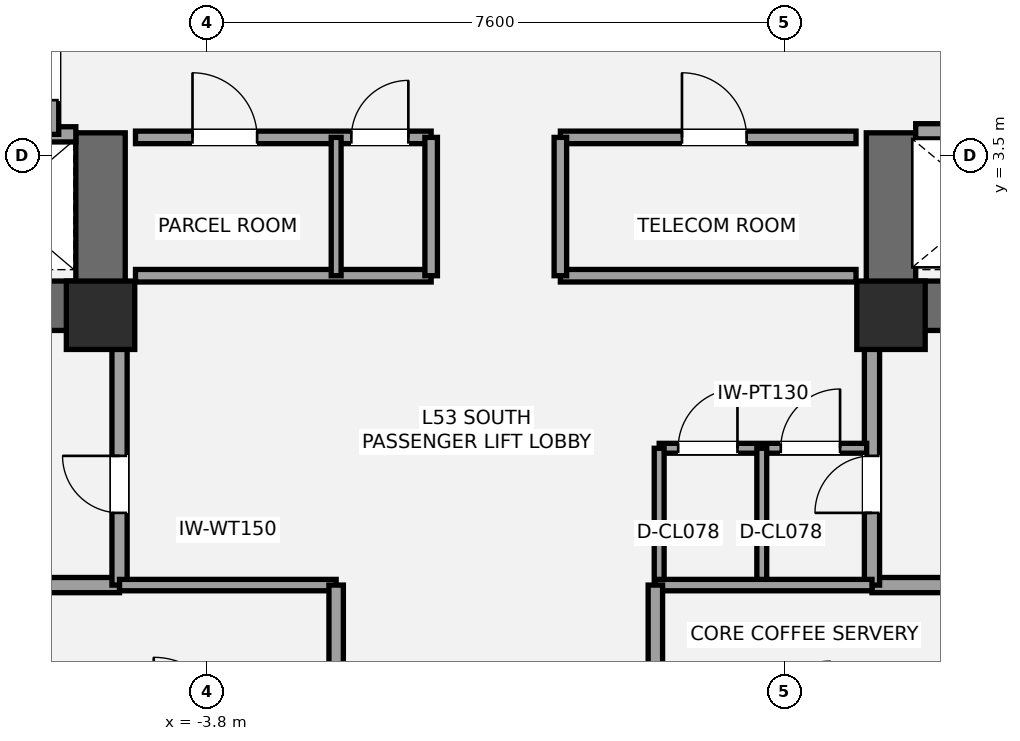
"""IFC4 building model, lengths in metres.
Left out: names, types, materials, properties, quantities, classifications, styles, units other than length and angle.
Written with IfcOpenShell. Run it as: python <this file> out.ifc"""

import sys

from ifc_helpers import new_model, si_unit, direction, frame, frame_2d, origin, origin_2d, place, context, subcontext, project, spatial, rectangle, extrude, element, fill, save


model = new_model("IFC4")
c1 = context("Model", 3, precision=1e-05, world=origin(), true_north=direction((0.0, 1.0)))
c2 = subcontext(c1, "Body", "Model", "MODEL_VIEW")
j1 = project(units=[si_unit("LENGTHUNIT", "METRE"), si_unit("PLANEANGLEUNIT", "RADIAN")], contexts=[c1])
p1 = place(None, origin())
s1 = spatial("IfcSite", under=j1, at=p1, CompositionType="ELEMENT")
p2 = place(p1, origin())
s2 = spatial("IfcBuilding", under=s1, at=p2, CompositionType="ELEMENT")
p3 = place(p2, frame((0.0, 0.0, 191.8)))
s3 = spatial("IfcBuildingStorey", under=s2, at=p3, CompositionType="ELEMENT", Elevation=191.8)
p4 = place(p3, frame((-4.875, 1.525, 0.0), z_axis=(0.0, 0.0, 1.0), x_axis=(-1.0, 0.0, 0.0)))
e1 = element("IfcWall", 1, at=p4, inside=s3, PredefinedType="SHEAR", context=c2, shape_type="SweptSolid", body=[
    extrude(rectangle(XDim=8.925, YDim=0.65, at=frame_2d((4.462, 0.0))), origin(), (0.0, 0.0, 1.0), 3.2),
])
p5 = place(p4, frame((5.425, 0.0, 0.0)))
e2 = element("IfcOpeningElement", 2, at=p5, cuts=e1, PredefinedType="OPENING", context=c2, shape_type="SweptSolid", body=[
    extrude(rectangle(XDim=1.05, YDim=2.15, at=frame_2d((0.525, 1.075))), frame((0.0, 0.335, 0.0), z_axis=(0.0, -1.0, 0.0), x_axis=(1.0, 0.0, 0.0)), (0.0, 0.0, 1.0), 0.67),
])
p6 = place(p4, frame((3.755, 0.0, 0.0)))
e3 = element("IfcOpeningElement", 3, at=p6, cuts=e1, PredefinedType="OPENING", context=c2, shape_type="SweptSolid", body=[
    extrude(rectangle(XDim=1.1, YDim=2.2, at=frame_2d((0.55, 1.1))), frame((0.0, 0.335, 0.0), z_axis=(0.0, -1.0, 0.0), x_axis=(1.0, 0.0, 0.0)), (0.0, 0.0, 1.0), 0.67),
])
p7 = place(p3, frame((-5.2, 1.2, 0.0), z_axis=(0.0, 0.0, 1.0), x_axis=(0.0, 1.0, 0.0)))
e4 = element("IfcWall", 4, at=p7, inside=s3, PredefinedType="SHEAR", context=c2, shape_type="SweptSolid", body=[
    extrude(rectangle(XDim=2.6, YDim=0.65, at=frame_2d((1.3, 0.0))), origin(), (0.0, 0.0, 1.0), 3.2),
])
p8 = place(p3, frame((13.8, 1.525, 0.0), z_axis=(0.0, 0.0, 1.0), x_axis=(-1.0, 0.0, 0.0)))
e5 = element("IfcWall", 5, at=p8, inside=s3, PredefinedType="SHEAR", context=c2, shape_type="SweptSolid", body=[
    extrude(rectangle(XDim=8.925, YDim=0.65, at=frame_2d((4.462, 0.0))), origin(), (0.0, 0.0, 1.0), 3.2),
])
p9 = place(p8, frame((2.45, 0.0, 0.0)))
e6 = element("IfcOpeningElement", 6, at=p9, cuts=e5, PredefinedType="OPENING", context=c2, shape_type="SweptSolid", body=[
    extrude(rectangle(XDim=1.05, YDim=2.15, at=frame_2d((0.525, 1.075))), frame((0.0, 0.335, 0.0), z_axis=(0.0, -1.0, 0.0), x_axis=(1.0, 0.0, 0.0)), (0.0, 0.0, 1.0), 0.67),
])
p10 = place(p8, frame((4.45, 0.0, 0.0)))
e7 = element("IfcOpeningElement", 7, at=p10, cuts=e5, PredefinedType="OPENING", context=c2, shape_type="SweptSolid", body=[
    extrude(rectangle(XDim=1.1, YDim=2.2, at=frame_2d((0.55, 1.1))), frame((0.0, 0.335, 0.0), z_axis=(0.0, -1.0, 0.0), x_axis=(1.0, 0.0, 0.0)), (0.0, 0.0, 1.0), 0.67),
])
p11 = place(p3, frame((5.2, 1.2, 0.0), z_axis=(0.0, 0.0, 1.0), x_axis=(0.0, 1.0, 0.0)))
e8 = element("IfcWall", 8, at=p11, inside=s3, PredefinedType="SHEAR", context=c2, shape_type="SweptSolid", body=[
    extrude(rectangle(XDim=2.6, YDim=0.65, at=frame_2d((1.3, 0.0))), origin(), (0.0, 0.0, 1.0), 3.2),
])
for number, where, z_axis, x_axis in (
    (9, (-5.2, 1.4, 0.0), (0.0, 0.0, 1.0), (1.0, 0.0, 0.0)),
    (10, (5.2, 1.4, 0.0), (0.0, 0.0, 1.0), (1.0, 0.0, 0.0)),
):
    element("IfcColumn", number, at=place(p3, frame(where, z_axis=z_axis, x_axis=x_axis)), inside=s3, PredefinedType="COLUMN", context=c2, shape_type="SweptSolid", body=[
        extrude(rectangle(XDim=0.9, YDim=0.9, at=origin_2d()), origin(), (0.0, 0.0, 1.0), 3.2),
    ])
p12 = place(p3, frame((-7.2, -2.15, 0.0), z_axis=(0.0, 0.0, 1.0), x_axis=(1.0, 0.0, 0.0)))
e11 = element("IfcWall", 11, at=p12, inside=s3, PredefinedType="SOLIDWALL", context=c2, shape_type="SweptSolid", body=[
    extrude(rectangle(XDim=2.25, YDim=0.2, at=frame_2d((1.125, 0.0))), origin(), (0.0, 0.0, 1.0), 3.02),
])
p13 = place(p3, frame((-4.95, -2.15, 0.0), z_axis=(0.0, 0.0, 1.0), x_axis=(0.0, 1.0, 0.0)))
e12 = element("IfcWall", 12, at=p13, inside=s3, PredefinedType="SOLIDWALL", context=c2, shape_type="SweptSolid", body=[
    extrude(rectangle(XDim=3.4, YDim=0.2, at=frame_2d((1.7, 0.0))), origin(), (0.0, 0.0, 1.0), 2.473),
])
p14 = place(p13, frame((0.95, 0.0, 0.0)))
e13 = element("IfcOpeningElement", 13, at=p14, cuts=e12, PredefinedType="OPENING", context=c2, shape_type="SweptSolid", body=[
    extrude(rectangle(XDim=0.75, YDim=2.1, at=frame_2d((0.375, 1.05))), frame((0.0, 0.11, 0.0), z_axis=(0.0, -1.0, 0.0), x_axis=(1.0, 0.0, 0.0)), (0.0, 0.0, 1.0), 0.22),
])
p15 = place(p3, frame((4.95, -2.15, 0.0), z_axis=(0.0, 0.0, 1.0), x_axis=(1.0, 0.0, 0.0)))
e14 = element("IfcWall", 14, at=p15, inside=s3, PredefinedType="SOLIDWALL", context=c2, shape_type="SweptSolid", body=[
    extrude(rectangle(XDim=2.25, YDim=0.2, at=frame_2d((1.125, 0.0))), origin(), (0.0, 0.0, 1.0), 3.02),
])
p16 = place(p3, frame((4.95, -2.15, 0.0), z_axis=(0.0, 0.0, 1.0), x_axis=(0.0, 1.0, 0.0)))
e15 = element("IfcWall", 15, at=p16, inside=s3, PredefinedType="SOLIDWALL", context=c2, shape_type="SweptSolid", body=[
    extrude(rectangle(XDim=3.4, YDim=0.2, at=frame_2d((1.7, 0.0))), origin(), (0.0, 0.0, 1.0), 2.473),
])
p17 = place(p16, frame((0.95, 0.0, 0.0)))
e16 = element("IfcOpeningElement", 16, at=p17, cuts=e15, PredefinedType="OPENING", context=c2, shape_type="SweptSolid", body=[
    extrude(rectangle(XDim=0.75, YDim=2.1, at=frame_2d((0.375, 1.05))), frame((0.0, 0.11, 0.0), z_axis=(0.0, -1.0, 0.0), x_axis=(1.0, 0.0, 0.0)), (0.0, 0.0, 1.0), 0.22),
])
p18 = place(p3, frame((2.15, -0.35, 0.0), z_axis=(0.0, 0.0, 1.0), x_axis=(1.0, 0.0, 0.0)))
e17 = element("IfcWall", 17, at=p18, inside=s3, PredefinedType="PARTITIONING", context=c2, shape_type="SweptSolid", body=[
    extrude(rectangle(XDim=2.73, YDim=0.13, at=frame_2d((1.365, 0.0))), origin(), (0.0, 0.0, 1.0), 3.02),
])
p19 = place(p18, frame((0.25, 0.0, 0.0)))
e18 = element("IfcOpeningElement", 18, at=p19, cuts=e17, PredefinedType="OPENING", context=c2, shape_type="SweptSolid", body=[
    extrude(rectangle(XDim=0.78, YDim=2.1, at=frame_2d((0.39, 1.05))), frame((0.0, 0.075, 0.0), z_axis=(0.0, -1.0, 0.0), x_axis=(1.0, 0.0, 0.0)), (0.0, 0.0, 1.0), 0.15),
])
p20 = place(p18, frame((1.6, 0.0, 0.0)))
e19 = element("IfcOpeningElement", 19, at=p20, cuts=e17, PredefinedType="OPENING", context=c2, shape_type="SweptSolid", body=[
    extrude(rectangle(XDim=0.78, YDim=2.1, at=frame_2d((0.39, 1.05))), frame((0.0, 0.075, 0.0), z_axis=(0.0, -1.0, 0.0), x_axis=(1.0, 0.0, 0.0)), (0.0, 0.0, 1.0), 0.15),
])
for number, where, z_axis, x_axis in (
    (20, (2.15, -2.15, 0.0), (0.0, 0.0, 1.0), (0.0, 1.0, 0.0)),
    (21, (3.5, -2.15, 0.0), (0.0, 0.0, 1.0), (0.0, 1.0, 0.0)),
):
    element("IfcWall", number, at=place(p3, frame(where, z_axis=z_axis, x_axis=x_axis)), inside=s3, PredefinedType="PARTITIONING", context=c2, shape_type="SweptSolid", body=[
        extrude(rectangle(XDim=1.8, YDim=0.13, at=frame_2d((0.9, 0.0))), origin(), (0.0, 0.0, 1.0), 3.02),
    ])
p21 = place(p3, frame((-9.78, 3.78, 0.0), z_axis=(0.0, 0.0, 1.0), x_axis=(1.0, 0.0, 0.0)))
e22 = element("IfcWall", 22, at=p21, inside=s3, PredefinedType="SOLIDWALL", context=c2, shape_type="SweptSolid", body=[
    extrude(rectangle(XDim=4.255, YDim=0.2, at=frame_2d((2.127, 0.0))), origin(), (0.0, 0.0, 1.0), 3.02),
])
p22 = place(p3, frame((-5.85, 3.78, 0.0), z_axis=(0.0, 0.0, 1.0), x_axis=(0.0, 1.0, 0.0)))
e23 = element("IfcWall", 23, at=p22, inside=s3, PredefinedType="SOLIDWALL", context=c2, shape_type="SweptSolid", body=[
    extrude(rectangle(XDim=1.69, YDim=0.2, at=frame_2d((0.845, 0.0))), origin(), (0.0, 0.0, 1.0), 3.02),
])
p23 = place(p22, frame((0.45, 0.0, 0.0)))
e24 = element("IfcOpeningElement", 24, at=p23, cuts=e23, PredefinedType="OPENING", context=c2, shape_type="SweptSolid", body=[
    extrude(rectangle(XDim=0.75, YDim=2.1, at=frame_2d((0.375, 1.05))), frame((0.0, 0.11, 0.0), z_axis=(0.0, -1.0, 0.0), x_axis=(1.0, 0.0, 0.0)), (0.0, 0.0, 1.0), 0.22),
])
p24 = place(p3, frame((5.525, 3.82, 0.0), z_axis=(0.0, 0.0, 1.0), x_axis=(1.0, 0.0, 0.0)))
e25 = element("IfcWall", 25, at=p24, inside=s3, PredefinedType="SOLIDWALL", context=c2, shape_type="SweptSolid", body=[
    extrude(rectangle(XDim=4.255, YDim=0.2, at=frame_2d((2.127, 0.0))), origin(), (0.0, 0.0, 1.0), 3.02),
])
p25 = place(p24, frame((0.65, 0.0, 0.0)))
e26 = element("IfcOpeningElement", 26, at=p25, cuts=e25, PredefinedType="OPENING", context=c2, shape_type="SweptSolid", body=[
    extrude(rectangle(XDim=1.2, YDim=2.2, at=frame_2d((0.6, 1.1))), frame((0.0, 0.11, 0.0), z_axis=(0.0, -1.0, 0.0), x_axis=(1.0, 0.0, 0.0)), (0.0, 0.0, 1.0), 0.22),
])
p26 = place(p3, frame((-4.74, 1.92, 0.0), z_axis=(0.0, 0.0, 1.0), x_axis=(1.0, 0.0, 0.0)))
e27 = element("IfcWall", 27, at=p26, inside=s3, PredefinedType="PARTITIONING", context=c2, shape_type="SweptSolid", body=[
    extrude(rectangle(XDim=3.89, YDim=0.165, at=frame_2d((1.945, 0.0))), origin(), (0.0, 0.0, 1.0), 2.16),
])
p27 = place(p3, frame((-4.74, 3.74, 0.0), z_axis=(0.0, 0.0, 1.0), x_axis=(1.0, 0.0, 0.0)))
e28 = element("IfcWall", 28, at=p27, inside=s3, PredefinedType="PARTITIONING", context=c2, shape_type="SweptSolid", body=[
    extrude(rectangle(XDim=3.89, YDim=0.165, at=frame_2d((1.945, 0.0))), origin(), (0.0, 0.0, 1.0), 3.02),
])
p28 = place(p27, frame((0.75, 0.0, 0.0)))
e29 = element("IfcOpeningElement", 29, at=p28, cuts=e28, PredefinedType="OPENING", context=c2, shape_type="SweptSolid", body=[
    extrude(rectangle(XDim=0.85, YDim=2.1, at=frame_2d((0.425, 1.05))), frame((0.0, 0.093, 0.0), z_axis=(0.0, -1.0, 0.0), x_axis=(1.0, 0.0, 0.0)), (0.0, 0.0, 1.0), 0.185),
])
p29 = place(p27, frame((2.84, 0.0, 0.0)))
e30 = element("IfcOpeningElement", 30, at=p29, cuts=e28, PredefinedType="OPENING", context=c2, shape_type="SweptSolid", body=[
    extrude(rectangle(XDim=0.75, YDim=2.1, at=frame_2d((0.375, 1.05))), frame((0.0, 0.093, 0.0), z_axis=(0.0, -1.0, 0.0), x_axis=(1.0, 0.0, 0.0)), (0.0, 0.0, 1.0), 0.185),
])
p30 = place(p3, frame((-0.85, 1.92, 0.0), z_axis=(0.0, 0.0, 1.0), x_axis=(0.0, 1.0, 0.0)))
e31 = element("IfcWall", 31, at=p30, inside=s3, PredefinedType="PARTITIONING", context=c2, shape_type="SweptSolid", body=[
    extrude(rectangle(XDim=1.82, YDim=0.165, at=frame_2d((0.91, 0.0))), origin(), (0.0, 0.0, 1.0), 3.02),
])
p31 = place(p3, frame((0.85, 1.92, 0.0), z_axis=(0.0, 0.0, 1.0), x_axis=(1.0, 0.0, 0.0)))
e32 = element("IfcWall", 32, at=p31, inside=s3, PredefinedType="PARTITIONING", context=c2, shape_type="SweptSolid", body=[
    extrude(rectangle(XDim=3.89, YDim=0.165, at=frame_2d((1.945, 0.0))), origin(), (0.0, 0.0, 1.0), 2.16),
])
p32 = place(p3, frame((0.85, 3.74, 0.0), z_axis=(0.0, 0.0, 1.0), x_axis=(1.0, 0.0, 0.0)))
e33 = element("IfcWall", 33, at=p32, inside=s3, PredefinedType="PARTITIONING", context=c2, shape_type="SweptSolid", body=[
    extrude(rectangle(XDim=3.89, YDim=0.165, at=frame_2d((1.945, 0.0))), origin(), (0.0, 0.0, 1.0), 3.02),
])
p33 = place(p32, frame((1.6, 0.0, 0.0)))
e34 = element("IfcOpeningElement", 34, at=p33, cuts=e33, PredefinedType="OPENING", context=c2, shape_type="SweptSolid", body=[
    extrude(rectangle(XDim=0.85, YDim=2.1, at=frame_2d((0.425, 1.05))), frame((0.0, 0.093, 0.0), z_axis=(0.0, -1.0, 0.0), x_axis=(1.0, 0.0, 0.0)), (0.0, 0.0, 1.0), 0.185),
])
p34 = place(p3, frame((0.85, 1.92, 0.0), z_axis=(0.0, 0.0, 1.0), x_axis=(0.0, 1.0, 0.0)))
e35 = element("IfcWall", 35, at=p34, inside=s3, PredefinedType="PARTITIONING", context=c2, shape_type="SweptSolid", body=[
    extrude(rectangle(XDim=1.82, YDim=0.165, at=frame_2d((0.91, 0.0))), origin(), (0.0, 0.0, 1.0), 3.02),
])
p35 = place(p3, frame((-2.1, 1.92, 0.0), z_axis=(0.0, 0.0, 1.0), x_axis=(0.0, 1.0, 0.0)))
e36 = element("IfcWall", 36, at=p35, inside=s3, PredefinedType="PARTITIONING", context=c2, shape_type="SweptSolid", body=[
    extrude(rectangle(XDim=1.82, YDim=0.13, at=frame_2d((0.91, 0.0))), origin(), (0.0, 0.0, 1.0), 3.02),
])
p36 = place(p3, frame((-4.95, -2.15, 0.0), z_axis=(0.0, 0.0, 1.0), x_axis=(1.0, 0.0, 0.0)))
e37 = element("IfcWall", 37, at=p36, inside=s3, PredefinedType="PLUMBINGWALL", context=c2, shape_type="SweptSolid", body=[
    extrude(rectangle(XDim=2.85, YDim=0.15, at=frame_2d((1.425, 0.0))), origin(), (0.0, 0.0, 1.0), 3.02),
])
p37 = place(p3, frame((-2.1, -4.05, 0.0), z_axis=(0.0, 0.0, 1.0), x_axis=(0.0, 1.0, 0.0)))
e38 = element("IfcWall", 38, at=p37, inside=s3, PredefinedType="PLUMBINGWALL", context=c2, shape_type="SweptSolid", body=[
    extrude(rectangle(XDim=1.9, YDim=0.19, at=frame_2d((0.95, 0.0))), origin(), (0.0, 0.0, 1.0), 3.02),
])
p38 = place(p3, frame((2.1, -2.15, 0.0), z_axis=(0.0, 0.0, 1.0), x_axis=(1.0, 0.0, 0.0)))
e39 = element("IfcWall", 39, at=p38, inside=s3, PredefinedType="PLUMBINGWALL", context=c2, shape_type="SweptSolid", body=[
    extrude(rectangle(XDim=2.85, YDim=0.15, at=frame_2d((1.425, 0.0))), origin(), (0.0, 0.0, 1.0), 3.02),
])
p39 = place(p3, frame((2.1, -4.05, 0.0), z_axis=(0.0, 0.0, 1.0), x_axis=(0.0, 1.0, 0.0)))
e40 = element("IfcWall", 40, at=p39, inside=s3, PredefinedType="PLUMBINGWALL", context=c2, shape_type="SweptSolid", body=[
    extrude(rectangle(XDim=1.9, YDim=0.19, at=frame_2d((0.95, 0.0))), origin(), (0.0, 0.0, 1.0), 3.02),
])
p40 = place(p14, origin())
e41 = element("IfcDoor", 41, at=p40, inside=s3, OperationType="SINGLE_SWING_RIGHT", PredefinedType="DOOR", context=c2, shape_type="SweptSolid", body=[
    extrude(rectangle(XDim=0.75, YDim=2.1, at=frame_2d((0.375, 1.05))), frame((0.0, 0.025, 0.0), z_axis=(0.0, -1.0, 0.0), x_axis=(1.0, 0.0, 0.0)), (0.0, 0.0, 1.0), 0.05),
])
fill(e13, e41)
p41 = place(p17, origin())
e42 = element("IfcDoor", 42, at=p41, inside=s3, OperationType="SINGLE_SWING_LEFT", PredefinedType="DOOR", context=c2, shape_type="SweptSolid", body=[
    extrude(rectangle(XDim=0.75, YDim=2.1, at=frame_2d((0.375, 1.05))), frame((0.0, 0.025, 0.0), z_axis=(0.0, -1.0, 0.0), x_axis=(1.0, 0.0, 0.0)), (0.0, 0.0, 1.0), 0.05),
])
fill(e16, e42)
p42 = place(p19, origin())
e43 = element("IfcDoor", 43, at=p42, inside=s3, OperationType="SINGLE_SWING_RIGHT", PredefinedType="DOOR", context=c2, shape_type="SweptSolid", body=[
    extrude(rectangle(XDim=0.78, YDim=2.1, at=frame_2d((0.39, 1.05))), frame((0.0, 0.025, 0.0), z_axis=(0.0, -1.0, 0.0), x_axis=(1.0, 0.0, 0.0)), (0.0, 0.0, 1.0), 0.05),
])
fill(e18, e43)
p43 = place(p20, origin())
e44 = element("IfcDoor", 44, at=p43, inside=s3, OperationType="SINGLE_SWING_RIGHT", PredefinedType="DOOR", context=c2, shape_type="SweptSolid", body=[
    extrude(rectangle(XDim=0.78, YDim=2.1, at=frame_2d((0.39, 1.05))), frame((0.0, 0.025, 0.0), z_axis=(0.0, -1.0, 0.0), x_axis=(1.0, 0.0, 0.0)), (0.0, 0.0, 1.0), 0.05),
])
fill(e19, e44)
p44 = place(p23, origin())
e45 = element("IfcDoor", 45, at=p44, inside=s3, OperationType="SINGLE_SWING_RIGHT", PredefinedType="DOOR", context=c2, shape_type="SweptSolid", body=[
    extrude(rectangle(XDim=0.75, YDim=2.1, at=frame_2d((0.375, 1.05))), frame((0.0, 0.025, 0.0), z_axis=(0.0, -1.0, 0.0), x_axis=(1.0, 0.0, 0.0)), (0.0, 0.0, 1.0), 0.05),
])
fill(e24, e45)
p45 = place(p28, origin())
e46 = element("IfcDoor", 46, at=p45, inside=s3, OperationType="SINGLE_SWING_LEFT", PredefinedType="DOOR", context=c2, shape_type="SweptSolid", body=[
    extrude(rectangle(XDim=0.85, YDim=2.1, at=frame_2d((0.425, 1.05))), frame((0.0, 0.025, 0.0), z_axis=(0.0, -1.0, 0.0), x_axis=(1.0, 0.0, 0.0)), (0.0, 0.0, 1.0), 0.05),
])
fill(e29, e46)
p46 = place(p29, origin())
e47 = element("IfcDoor", 47, at=p46, inside=s3, OperationType="SINGLE_SWING_RIGHT", PredefinedType="DOOR", context=c2, shape_type="SweptSolid", body=[
    extrude(rectangle(XDim=0.75, YDim=2.1, at=frame_2d((0.375, 1.05))), frame((0.0, 0.025, 0.0), z_axis=(0.0, -1.0, 0.0), x_axis=(1.0, 0.0, 0.0)), (0.0, 0.0, 1.0), 0.05),
])
fill(e30, e47)
p47 = place(p33, origin())
e48 = element("IfcDoor", 48, at=p47, inside=s3, OperationType="SINGLE_SWING_LEFT", PredefinedType="DOOR", context=c2, shape_type="SweptSolid", body=[
    extrude(rectangle(XDim=0.85, YDim=2.1, at=frame_2d((0.425, 1.05))), frame((0.0, 0.025, 0.0), z_axis=(0.0, -1.0, 0.0), x_axis=(1.0, 0.0, 0.0)), (0.0, 0.0, 1.0), 0.05),
])
fill(e34, e48)
save(model, sys.argv[1])
